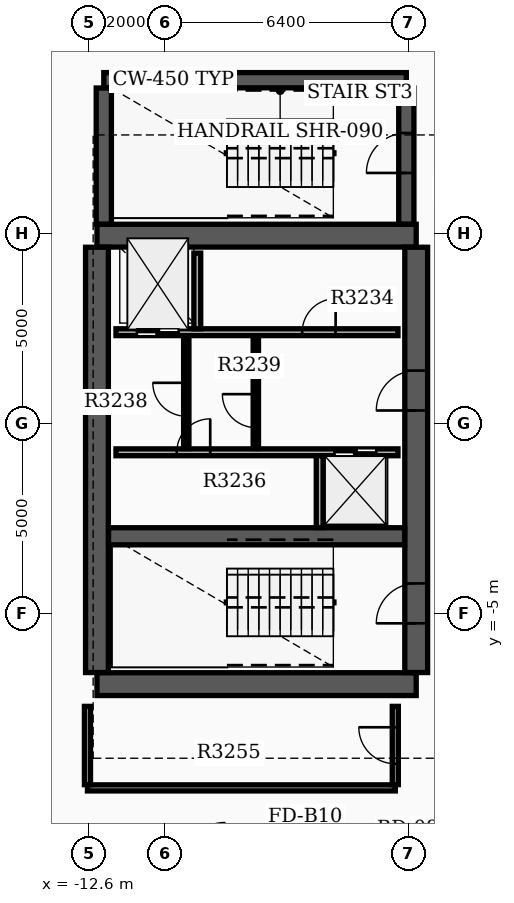
"""IFC4 building model, lengths in metres.
Left out: names, types, materials, properties, quantities, classifications, styles, units other than length and angle.
Written with IfcOpenShell. Run it as: python <this file> out.ifc"""

import sys

from ifc_helpers import new_model, si_unit, direction, frame, frame_2d, origin, place, context, subcontext, project, spatial, rectangle, extrude, element, fill, save


model = new_model("IFC4")
c1 = context("Model", 3, precision=1e-05, world=origin(), true_north=direction((0.0, 1.0)))
c2 = subcontext(c1, "Body", "Model", "MODEL_VIEW")
j1 = project(units=[si_unit("LENGTHUNIT", "METRE"), si_unit("PLANEANGLEUNIT", "RADIAN")], contexts=[c1])
p1 = place(None, origin())
s1 = spatial("IfcSite", under=j1, at=p1, CompositionType="ELEMENT")
p2 = place(p1, origin())
s2 = spatial("IfcBuilding", under=s1, at=p2, CompositionType="ELEMENT")
p3 = place(p2, frame((0.0, 0.0, 205.2)))
s3 = spatial("IfcBuildingStorey", under=s2, at=p3, CompositionType="ELEMENT", Elevation=205.2)
for number, where, z_axis, x_axis in (
    (1, (-12.4, -6.85, 0.0), (0.0, 0.0, 1.0), (1.0, 0.0, 0.0)),
    (2, (-12.4, 4.95, 0.0), (0.0, 0.0, 1.0), (1.0, 0.0, 0.0)),
):
    element("IfcWall", number, at=place(p3, frame(where, z_axis=z_axis, x_axis=x_axis)), inside=s3, PredefinedType="SHEAR", context=c2, shape_type="SweptSolid", body=[
        extrude(rectangle(XDim=8.4, YDim=0.6, at=frame_2d((4.2, 0.0))), origin(), (0.0, 0.0, 1.0), 3.7),
    ])
p4 = place(p3, frame((-12.4, -6.545, 0.0), z_axis=(0.0, 0.0, 1.0), x_axis=(0.0, 1.0, 0.0)))
e3 = element("IfcWall", 3, at=p4, inside=s3, PredefinedType="SHEAR", context=c2, shape_type="SweptSolid", body=[
    extrude(rectangle(XDim=11.19, YDim=0.6, at=frame_2d((5.595, 0.0))), origin(), (0.0, 0.0, 1.0), 3.7),
])
p5 = place(p3, frame((-4.0, -6.545, 0.0), z_axis=(0.0, 0.0, 1.0), x_axis=(0.0, 1.0, 0.0)))
e4 = element("IfcWall", 4, at=p5, inside=s3, PredefinedType="SHEAR", context=c2, shape_type="SweptSolid", body=[
    extrude(rectangle(XDim=11.19, YDim=0.6, at=frame_2d((5.595, 0.0))), origin(), (0.0, 0.0, 1.0), 3.7),
])
p6 = place(p5, frame((1.295, 0.0, 0.0)))
e5 = element("IfcOpeningElement", 5, at=p6, cuts=e4, PredefinedType="OPENING", context=c2, shape_type="SweptSolid", body=[
    extrude(rectangle(XDim=1.05, YDim=2.15, at=frame_2d((0.525, 1.075))), frame((0.0, 0.31, 0.0), z_axis=(0.0, -1.0, 0.0), x_axis=(1.0, 0.0, 0.0)), (0.0, 0.0, 1.0), 0.62),
])
p7 = place(p5, frame((6.895, 0.0, 0.0)))
e6 = element("IfcOpeningElement", 6, at=p7, cuts=e4, PredefinedType="OPENING", context=c2, shape_type="SweptSolid", body=[
    extrude(rectangle(XDim=1.05, YDim=2.15, at=frame_2d((0.525, 1.075))), frame((0.0, 0.31, 0.0), z_axis=(0.0, -1.0, 0.0), x_axis=(1.0, 0.0, 0.0)), (0.0, 0.0, 1.0), 0.62),
])
p8 = place(p3, frame((-12.095, -2.96, 0.0), z_axis=(0.0, 0.0, 1.0), x_axis=(1.0, 0.0, 0.0)))
e7 = element("IfcWall", 7, at=p8, inside=s3, PredefinedType="SHEAR", context=c2, shape_type="SweptSolid", body=[
    extrude(rectangle(XDim=7.79, YDim=0.45, at=frame_2d((3.895, 0.0))), origin(), (0.0, 0.0, 1.0), 3.7),
])
p9 = place(p3, frame((-12.22, 9.04, 0.0), z_axis=(0.0, 0.0, 1.0), x_axis=(1.0, 0.0, 0.0)))
e8 = element("IfcWall", 8, at=p9, inside=s3, PredefinedType="SHEAR", context=c2, shape_type="SweptSolid", body=[
    extrude(rectangle(XDim=7.96, YDim=0.4, at=frame_2d((3.98, 0.0))), origin(), (0.0, 0.0, 1.0), 3.7),
])
p10 = place(p3, frame((-12.22, 5.255, 0.0), z_axis=(0.0, 0.0, 1.0), x_axis=(0.0, 1.0, 0.0)))
e9 = element("IfcWall", 9, at=p10, inside=s3, PredefinedType="SHEAR", context=c2, shape_type="SweptSolid", body=[
    extrude(rectangle(XDim=3.58, YDim=0.4, at=frame_2d((1.79, 0.0))), origin(), (0.0, 0.0, 1.0), 3.7),
])
p11 = place(p3, frame((-4.26, 5.255, 0.0), z_axis=(0.0, 0.0, 1.0), x_axis=(0.0, 1.0, 0.0)))
e10 = element("IfcWall", 10, at=p11, inside=s3, PredefinedType="SHEAR", context=c2, shape_type="SweptSolid", body=[
    extrude(rectangle(XDim=3.58, YDim=0.4, at=frame_2d((1.79, 0.0))), origin(), (0.0, 0.0, 1.0), 3.7),
])
p12 = place(p11, frame((1.345, 0.0, 0.0)))
e11 = element("IfcOpeningElement", 11, at=p12, cuts=e10, PredefinedType="OPENING", context=c2, shape_type="SweptSolid", body=[
    extrude(rectangle(XDim=1.05, YDim=2.15, at=frame_2d((0.525, 1.075))), frame((0.0, 0.21, 0.0), z_axis=(0.0, -1.0, 0.0), x_axis=(1.0, 0.0, 0.0)), (0.0, 0.0, 1.0), 0.42),
])
p13 = place(p3, frame((-14.238, -7.721, 0.0), z_axis=(0.0, 0.0, 1.0), x_axis=(0.078438149236, -0.996918982036, 0.0)))
e12 = element("IfcWall", 12, at=p13, inside=s3, PredefinedType="STANDARD", context=c2, shape_type="SweptSolid", body=[
    extrude(rectangle(XDim=6.86, YDim=0.28, at=frame_2d((3.43, 0.0))), origin(), (0.0, 0.0, 1.0), 3.18),
])
p14 = place(p3, frame((-11.9, 2.41, 0.0), z_axis=(0.0, 0.0, 1.0), x_axis=(1.0, 0.0, 0.0)))
e13 = element("IfcWall", 13, at=p14, inside=s3, PredefinedType="SOLIDWALL", context=c2, shape_type="SweptSolid", body=[
    extrude(rectangle(XDim=7.42, YDim=0.18, at=frame_2d((3.71, 0.0))), origin(), (0.0, 0.0, 1.0), 3.17),
])
p15 = place(p14, frame((0.55, 0.0, 0.0)))
e14 = element("IfcOpeningElement", 14, at=p15, cuts=e13, PredefinedType="OPENING", context=c2, shape_type="SweptSolid", body=[
    extrude(rectangle(XDim=1.1, YDim=2.15, at=frame_2d((0.55, 1.075))), frame((0.0, 0.1, 0.0), z_axis=(0.0, -1.0, 0.0), x_axis=(1.0, 0.0, 0.0)), (0.0, 0.0, 1.0), 0.2),
])
p16 = place(p14, frame((4.9, 0.0, 0.0)))
e15 = element("IfcOpeningElement", 15, at=p16, cuts=e13, PredefinedType="OPENING", context=c2, shape_type="SweptSolid", body=[
    extrude(rectangle(XDim=0.88, YDim=2.1, at=frame_2d((0.44, 1.05))), frame((0.0, 0.1, 0.0), z_axis=(0.0, -1.0, 0.0), x_axis=(1.0, 0.0, 0.0)), (0.0, 0.0, 1.0), 0.2),
])
p17 = place(p3, frame((-11.9, -0.75, 0.0), z_axis=(0.0, 0.0, 1.0), x_axis=(1.0, 0.0, 0.0)))
e16 = element("IfcWall", 16, at=p17, inside=s3, PredefinedType="SOLIDWALL", context=c2, shape_type="SweptSolid", body=[
    extrude(rectangle(XDim=7.42, YDim=0.18, at=frame_2d((3.71, 0.0))), origin(), (0.0, 0.0, 1.0), 3.17),
])
p18 = place(p17, frame((5.75, 0.0, 0.0)))
e17 = element("IfcOpeningElement", 17, at=p18, cuts=e16, PredefinedType="OPENING", context=c2, shape_type="SweptSolid", body=[
    extrude(rectangle(XDim=1.1, YDim=2.15, at=frame_2d((0.55, 1.075))), frame((0.0, 0.1, 0.0), z_axis=(0.0, -1.0, 0.0), x_axis=(1.0, 0.0, 0.0)), (0.0, 0.0, 1.0), 0.2),
])
p19 = place(p17, frame((1.6, 0.0, 0.0)))
e18 = element("IfcOpeningElement", 18, at=p19, cuts=e16, PredefinedType="OPENING", context=c2, shape_type="SweptSolid", body=[
    extrude(rectangle(XDim=0.88, YDim=2.1, at=frame_2d((0.44, 1.05))), frame((0.0, 0.1, 0.0), z_axis=(0.0, -1.0, 0.0), x_axis=(1.0, 0.0, 0.0)), (0.0, 0.0, 1.0), 0.2),
])
p20 = place(p3, frame((-9.76, 2.5, 0.0), z_axis=(0.0, 0.0, 1.0), x_axis=(0.0, 1.0, 0.0)))
e19 = element("IfcWall", 19, at=p20, inside=s3, PredefinedType="SOLIDWALL", context=c2, shape_type="SweptSolid", body=[
    extrude(rectangle(XDim=1.99, YDim=0.18, at=frame_2d((0.995, 0.0))), origin(), (0.0, 0.0, 1.0), 3.17),
])
p21 = place(p3, frame((-6.54, -2.73, 0.0), z_axis=(0.0, 0.0, 1.0), x_axis=(0.0, 1.0, 0.0)))
e20 = element("IfcWall", 20, at=p21, inside=s3, PredefinedType="SOLIDWALL", context=c2, shape_type="SweptSolid", body=[
    extrude(rectangle(XDim=1.89, YDim=0.18, at=frame_2d((0.945, 0.0))), origin(), (0.0, 0.0, 1.0), 3.17),
])
p22 = place(p3, frame((-8.22, -0.65, 0.0), z_axis=(0.0, 0.0, 1.0), x_axis=(0.0, 1.0, 0.0)))
e21 = element("IfcWall", 21, at=p22, inside=s3, PredefinedType="SOLIDWALL", context=c2, shape_type="SweptSolid", body=[
    extrude(rectangle(XDim=2.96, YDim=0.14, at=frame_2d((1.48, 0.0))), origin(), (0.0, 0.0, 1.0), 3.17),
])
p23 = place(p22, frame((0.55, 0.0, 0.0)))
e22 = element("IfcOpeningElement", 22, at=p23, cuts=e21, PredefinedType="OPENING", context=c2, shape_type="SweptSolid", body=[
    extrude(rectangle(XDim=0.88, YDim=2.1, at=frame_2d((0.44, 1.05))), frame((0.0, 0.08, 0.0), z_axis=(0.0, -1.0, 0.0), x_axis=(1.0, 0.0, 0.0)), (0.0, 0.0, 1.0), 0.16),
])
p24 = place(p3, frame((-10.05, -0.652, 0.0), z_axis=(0.0, 0.0, 1.0), x_axis=(0.0, 1.0, 0.0)))
e23 = element("IfcWall", 23, at=p24, inside=s3, PredefinedType="PARTITIONING", context=c2, shape_type="SweptSolid", body=[
    extrude(rectangle(XDim=2.962, YDim=0.14, at=frame_2d((1.481, 0.0))), origin(), (0.0, 0.0, 1.0), 3.17),
])
p25 = place(p24, frame((0.85, 0.0, 0.0)))
e24 = element("IfcOpeningElement", 24, at=p25, cuts=e23, PredefinedType="OPENING", context=c2, shape_type="SweptSolid", body=[
    extrude(rectangle(XDim=0.88, YDim=2.1, at=frame_2d((0.44, 1.05))), frame((0.0, 0.08, 0.0), z_axis=(0.0, -1.0, 0.0), x_axis=(1.0, 0.0, 0.0)), (0.0, 0.0, 1.0), 0.16),
])
p26 = place(p3, frame((-12.65, -9.58, 0.0), z_axis=(0.0, 0.0, 1.0), x_axis=(1.0, 0.0, 0.0)))
e25 = element("IfcWall", 25, at=p26, inside=s3, PredefinedType="PARTITIONING", context=c2, shape_type="SweptSolid", body=[
    extrude(rectangle(XDim=8.1, YDim=0.16, at=frame_2d((4.05, 0.0))), origin(), (0.0, 0.0, 1.0), 3.17),
])
p27 = place(p3, frame((-12.65, -9.495, 0.0), z_axis=(0.0, 0.0, 1.0), x_axis=(0.0, 1.0, 0.0)))
e26 = element("IfcWall", 26, at=p27, inside=s3, PredefinedType="PARTITIONING", context=c2, shape_type="SweptSolid", body=[
    extrude(rectangle(XDim=2.06, YDim=0.16, at=frame_2d((1.03, 0.0))), origin(), (0.0, 0.0, 1.0), 3.17),
])
p28 = place(p3, frame((-4.55, -9.495, 0.0), z_axis=(0.0, 0.0, 1.0), x_axis=(0.0, 1.0, 0.0)))
e27 = element("IfcWall", 27, at=p28, inside=s3, PredefinedType="PARTITIONING", context=c2, shape_type="SweptSolid", body=[
    extrude(rectangle(XDim=2.06, YDim=0.16, at=frame_2d((1.03, 0.0))), origin(), (0.0, 0.0, 1.0), 3.17),
])
p29 = place(p28, frame((0.55, 0.0, 0.0)))
e28 = element("IfcOpeningElement", 28, at=p29, cuts=e27, PredefinedType="OPENING", context=c2, shape_type="SweptSolid", body=[
    extrude(rectangle(XDim=0.96, YDim=2.15, at=frame_2d((0.48, 1.075))), frame((0.0, 0.09, 0.0), z_axis=(0.0, -1.0, 0.0), x_axis=(1.0, 0.0, 0.0)), (0.0, 0.0, 1.0), 0.18),
])
p30 = place(p6, origin())
e29 = element("IfcDoor", 29, at=p30, inside=s3, OperationType="SINGLE_SWING_LEFT", PredefinedType="DOOR", context=c2, shape_type="SweptSolid", body=[
    extrude(rectangle(XDim=1.05, YDim=2.15, at=frame_2d((0.525, 1.075))), frame((0.0, 0.025, 0.0), z_axis=(0.0, -1.0, 0.0), x_axis=(1.0, 0.0, 0.0)), (0.0, 0.0, 1.0), 0.05),
])
fill(e5, e29)
p31 = place(p7, origin())
e30 = element("IfcDoor", 30, at=p31, inside=s3, OperationType="SINGLE_SWING_LEFT", PredefinedType="DOOR", context=c2, shape_type="SweptSolid", body=[
    extrude(rectangle(XDim=1.05, YDim=2.15, at=frame_2d((0.525, 1.075))), frame((0.0, 0.025, 0.0), z_axis=(0.0, -1.0, 0.0), x_axis=(1.0, 0.0, 0.0)), (0.0, 0.0, 1.0), 0.05),
])
fill(e6, e30)
p32 = place(p12, origin())
e31 = element("IfcDoor", 31, at=p32, inside=s3, OperationType="SINGLE_SWING_LEFT", PredefinedType="DOOR", context=c2, shape_type="SweptSolid", body=[
    extrude(rectangle(XDim=1.05, YDim=2.15, at=frame_2d((0.525, 1.075))), frame((0.0, 0.025, 0.0), z_axis=(0.0, -1.0, 0.0), x_axis=(1.0, 0.0, 0.0)), (0.0, 0.0, 1.0), 0.05),
])
fill(e11, e31)
p33 = place(p15, origin())
e32 = element("IfcDoor", 32, at=p33, inside=s3, OperationType="DOUBLE_DOOR_SLIDING", PredefinedType="DOOR", context=c2, shape_type="SweptSolid", body=[
    extrude(rectangle(XDim=1.1, YDim=2.15, at=frame_2d((0.55, 1.075))), frame((0.0, 0.025, 0.0), z_axis=(0.0, -1.0, 0.0), x_axis=(1.0, 0.0, 0.0)), (0.0, 0.0, 1.0), 0.05),
])
fill(e14, e32)
p34 = place(p18, origin())
e33 = element("IfcDoor", 33, at=p34, inside=s3, OperationType="DOUBLE_DOOR_SLIDING", PredefinedType="DOOR", context=c2, shape_type="SweptSolid", body=[
    extrude(rectangle(XDim=1.1, YDim=2.15, at=frame_2d((0.55, 1.075))), frame((0.0, 0.025, 0.0), z_axis=(0.0, -1.0, 0.0), x_axis=(1.0, 0.0, 0.0)), (0.0, 0.0, 1.0), 0.05),
])
fill(e17, e33)
p35 = place(p16, origin())
e34 = element("IfcDoor", 34, at=p35, inside=s3, OperationType="SINGLE_SWING_RIGHT", PredefinedType="DOOR", context=c2, shape_type="SweptSolid", body=[
    extrude(rectangle(XDim=0.88, YDim=2.1, at=frame_2d((0.44, 1.05))), frame((0.0, 0.025, 0.0), z_axis=(0.0, -1.0, 0.0), x_axis=(1.0, 0.0, 0.0)), (0.0, 0.0, 1.0), 0.05),
])
fill(e15, e34)
p36 = place(p19, origin())
e35 = element("IfcDoor", 35, at=p36, inside=s3, OperationType="SINGLE_SWING_RIGHT", PredefinedType="DOOR", context=c2, shape_type="SweptSolid", body=[
    extrude(rectangle(XDim=0.88, YDim=2.1, at=frame_2d((0.44, 1.05))), frame((0.0, 0.025, 0.0), z_axis=(0.0, -1.0, 0.0), x_axis=(1.0, 0.0, 0.0)), (0.0, 0.0, 1.0), 0.05),
])
fill(e18, e35)
p37 = place(p23, origin())
e36 = element("IfcDoor", 36, at=p37, inside=s3, OperationType="SINGLE_SWING_RIGHT", PredefinedType="DOOR", context=c2, shape_type="SweptSolid", body=[
    extrude(rectangle(XDim=0.88, YDim=2.1, at=frame_2d((0.44, 1.05))), frame((0.0, 0.025, 0.0), z_axis=(0.0, -1.0, 0.0), x_axis=(1.0, 0.0, 0.0)), (0.0, 0.0, 1.0), 0.05),
])
fill(e22, e36)
p38 = place(p25, origin())
e37 = element("IfcDoor", 37, at=p38, inside=s3, OperationType="SINGLE_SWING_RIGHT", PredefinedType="DOOR", context=c2, shape_type="SweptSolid", body=[
    extrude(rectangle(XDim=0.88, YDim=2.1, at=frame_2d((0.44, 1.05))), frame((0.0, 0.025, 0.0), z_axis=(0.0, -1.0, 0.0), x_axis=(1.0, 0.0, 0.0)), (0.0, 0.0, 1.0), 0.05),
])
fill(e24, e37)
p39 = place(p29, origin())
e38 = element("IfcDoor", 38, at=p39, inside=s3, OperationType="SINGLE_SWING_RIGHT", PredefinedType="DOOR", context=c2, shape_type="SweptSolid", body=[
    extrude(rectangle(XDim=0.96, YDim=2.15, at=frame_2d((0.48, 1.075))), frame((0.0, 0.025, 0.0), z_axis=(0.0, -1.0, 0.0), x_axis=(1.0, 0.0, 0.0)), (0.0, 0.0, 1.0), 0.05),
])
fill(e28, e38)
save(model, sys.argv[1])
